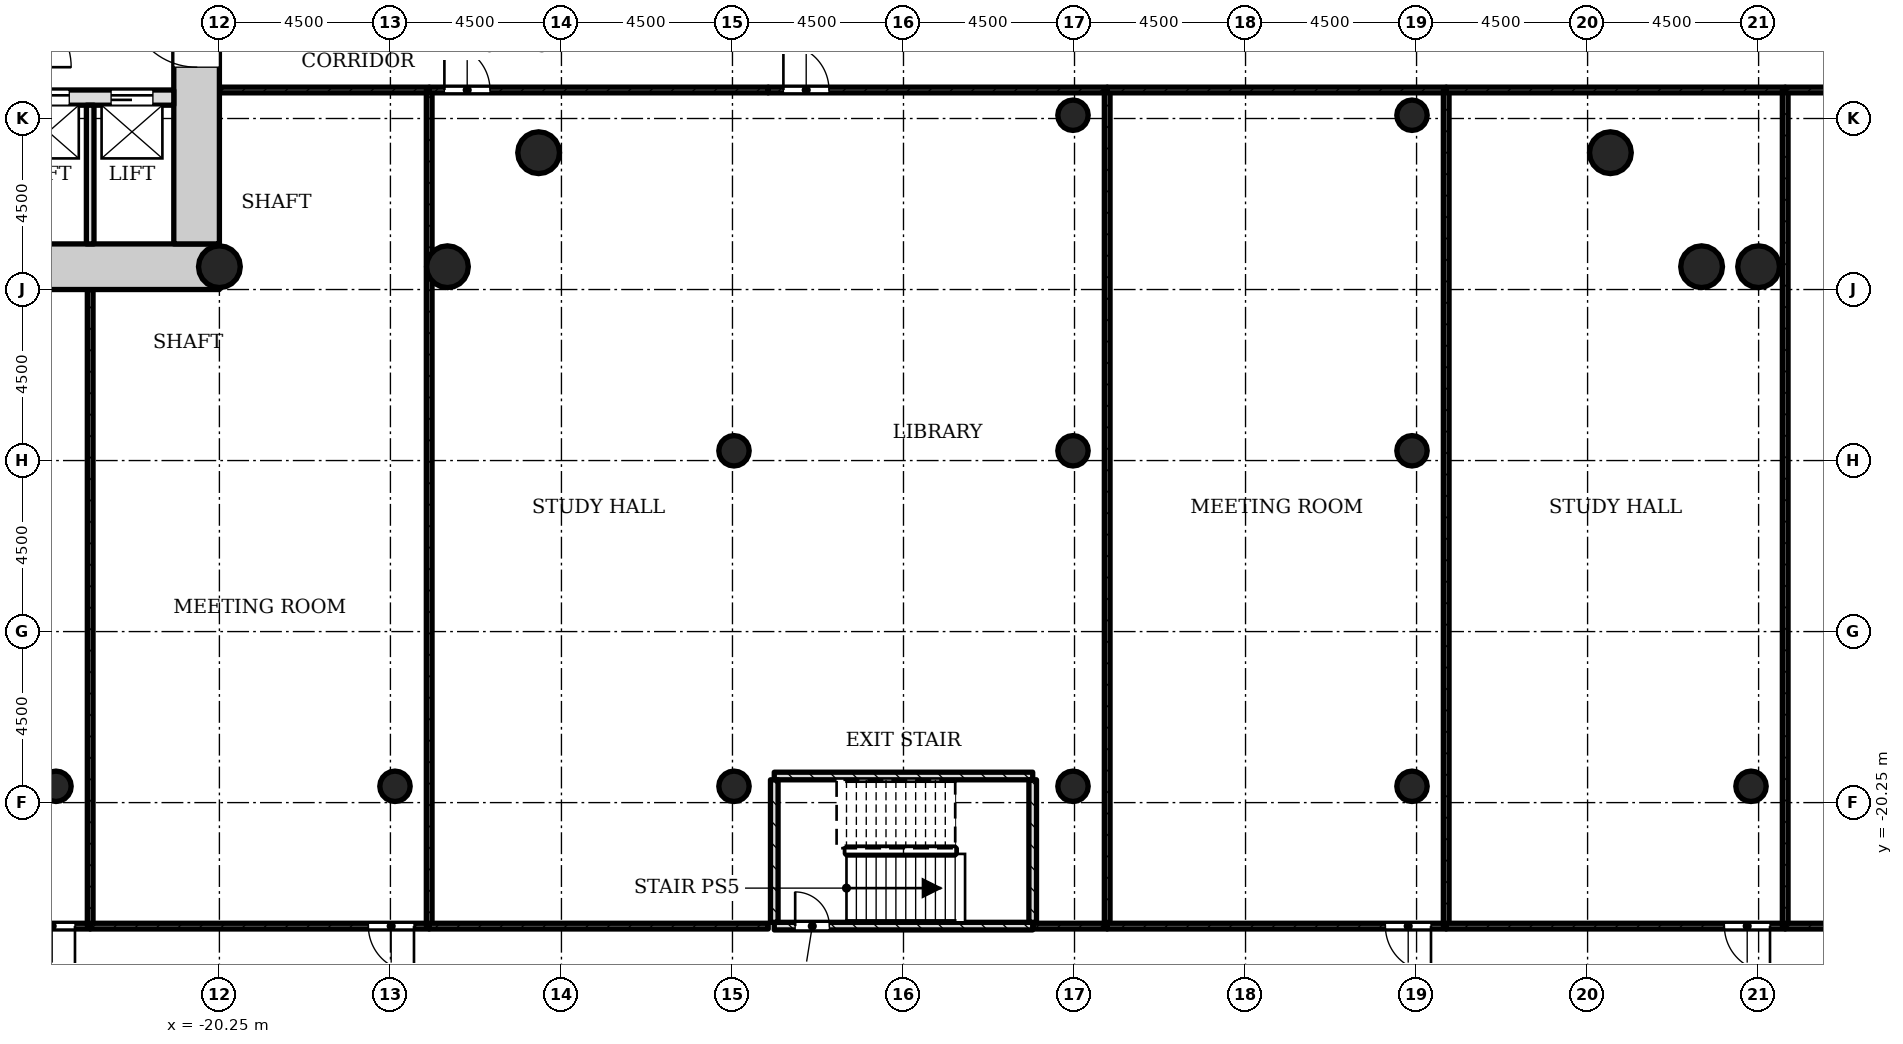
"""IFC4 building model, lengths in metres.
Left out: names, types, materials, properties, quantities, classifications, styles, units other than length and angle.
Written with IfcOpenShell. Run it as: python <this file> out.ifc"""

import sys

from ifc_helpers import new_model, si_unit, direction, frame, frame_2d, origin, origin_2d, place, context, subcontext, project, spatial, rectangle, hollow_circle, extrude, element, fill, save


model = new_model("IFC4")
c1 = context("Model", 3, precision=1e-05, world=origin(), true_north=direction((0.0, 1.0)))
c2 = subcontext(c1, "Body", "Model", "MODEL_VIEW")
j1 = project(units=[si_unit("LENGTHUNIT", "METRE"), si_unit("PLANEANGLEUNIT", "RADIAN")], contexts=[c1])
p1 = place(None, origin())
s1 = spatial("IfcSite", under=j1, at=p1, CompositionType="ELEMENT")
p2 = place(p1, origin())
s2 = spatial("IfcBuilding", under=s1, at=p2, CompositionType="ELEMENT")
p3 = place(p2, frame((0.0, 0.0, 11.0)))
s3 = spatial("IfcBuildingStorey", under=s2, at=p3, CompositionType="ELEMENT", Elevation=11.0)
p4 = place(p3, frame((-28.05, -6.15, 0.0), z_axis=(0.0, 0.0, 1.0), x_axis=(1.0, 0.0, 0.0)))
e1 = element("IfcWall", 1, at=p4, inside=s3, PredefinedType="SHEAR", context=c2, shape_type="SweptSolid", body=[
    extrude(rectangle(XDim=7.8, YDim=1.2, at=frame_2d((3.9, 0.0))), origin(), (0.0, 0.0, 1.0), 4.5),
])
p5 = place(p3, frame((-20.85, -5.55, 0.0), z_axis=(0.0, 0.0, 1.0), x_axis=(0.0, 1.0, 0.0)))
e2 = element("IfcWall", 2, at=p5, inside=s3, PredefinedType="SHEAR", context=c2, shape_type="SweptSolid", body=[
    extrude(rectangle(XDim=12.3, YDim=1.2, at=frame_2d((6.15, 0.0))), origin(), (0.0, 0.0, 1.0), 4.5),
])
p6 = place(p5, frame((4.65, 0.0, 0.0)))
e3 = element("IfcOpeningElement", 3, at=p6, cuts=e2, PredefinedType="OPENING", context=c2, shape_type="SweptSolid", body=[
    extrude(rectangle(XDim=1.8, YDim=2.1, at=frame_2d((0.9, 1.05))), frame((0.0, 0.61, 0.0), z_axis=(0.0, -1.0, 0.0), x_axis=(1.0, 0.0, 0.0)), (0.0, 0.0, 1.0), 1.22),
])
p7 = place(p3, frame((-28.05, -1.7, 0.0), z_axis=(0.0, 0.0, 1.0), x_axis=(1.0, 0.0, 0.0)))
e4 = element("IfcWall", 4, at=p7, inside=s3, PredefinedType="SHEAR", context=c2, shape_type="SweptSolid", body=[
    extrude(rectangle(XDim=6.6, YDim=0.4, at=frame_2d((3.3, 0.0))), origin(), (0.0, 0.0, 1.0), 4.5),
])
p8 = place(p7, frame((0.55, 0.0, 0.0)))
e5 = element("IfcOpeningElement", 5, at=p8, cuts=e4, PredefinedType="OPENING", context=c2, shape_type="SweptSolid", body=[
    extrude(rectangle(XDim=1.1, YDim=2.1, at=frame_2d((0.55, 1.05))), frame((0.0, 0.21, 0.0), z_axis=(0.0, -1.0, 0.0), x_axis=(1.0, 0.0, 0.0)), (0.0, 0.0, 1.0), 0.42),
])
p9 = place(p7, frame((2.75, 0.0, 0.0)))
e6 = element("IfcOpeningElement", 6, at=p9, cuts=e4, PredefinedType="OPENING", context=c2, shape_type="SweptSolid", body=[
    extrude(rectangle(XDim=1.1, YDim=2.1, at=frame_2d((0.55, 1.05))), frame((0.0, 0.21, 0.0), z_axis=(0.0, -1.0, 0.0), x_axis=(1.0, 0.0, 0.0)), (0.0, 0.0, 1.0), 0.42),
])
p10 = place(p7, frame((4.95, 0.0, 0.0)))
e7 = element("IfcOpeningElement", 7, at=p10, cuts=e4, PredefinedType="OPENING", context=c2, shape_type="SweptSolid", body=[
    extrude(rectangle(XDim=1.1, YDim=2.1, at=frame_2d((0.55, 1.05))), frame((0.0, 0.21, 0.0), z_axis=(0.0, -1.0, 0.0), x_axis=(1.0, 0.0, 0.0)), (0.0, 0.0, 1.0), 0.42),
])
for number, where, z_axis, x_axis in (
    (8, (-20.25, -6.15, 0.0), (0.0, 0.0, 1.0), (1.0, 0.0, 0.0)),
    (9, (-14.25, -6.15, 0.0), (0.0, 0.0, 1.0), (1.0, 0.0, 0.0)),
    (10, (-11.85, -3.15, 0.0), (0.0, 0.0, 1.0), (1.0, 0.0, 0.0)),
    (11, (20.25, -6.15, 0.0), (0.0, 0.0, 1.0), (1.0, 0.0, 0.0)),
    (12, (18.75, -6.15, 0.0), (0.0, 0.0, 1.0), (1.0, 0.0, 0.0)),
    (13, (16.35, -3.15, 0.0), (0.0, 0.0, 1.0), (1.0, 0.0, 0.0)),
):
    element("IfcColumn", number, at=place(p3, frame(where, z_axis=z_axis, x_axis=x_axis)), inside=s3, PredefinedType="COLUMN", context=c2, shape_type="SweptSolid", body=[
        extrude(hollow_circle(Radius=0.55, WallThickness=0.04, at=origin_2d()), origin(), (0.0, 0.0, 1.0), 4.5),
    ])
for number, where, z_axis, x_axis in (
    (14, (-24.55, -19.821, 0.0), (0.0, 0.0, 1.0), (1.0, 0.0, 0.0)),
    (15, (-15.63, -19.821, 0.0), (0.0, 0.0, 1.0), (1.0, 0.0, 0.0)),
    (16, (-6.71, -19.821, 0.0), (0.0, 0.0, 1.0), (1.0, 0.0, 0.0)),
    (17, (2.21, -19.821, 0.0), (0.0, 0.0, 1.0), (1.0, 0.0, 0.0)),
    (18, (11.13, -19.821, 0.0), (0.0, 0.0, 1.0), (1.0, 0.0, 0.0)),
    (19, (20.05, -19.821, 0.0), (0.0, 0.0, 1.0), (1.0, 0.0, 0.0)),
    (20, (-6.71, -10.993, 0.0), (0.0, 0.0, 1.0), (1.0, 0.0, 0.0)),
    (21, (2.21, -10.993, 0.0), (0.0, 0.0, 1.0), (1.0, 0.0, 0.0)),
    (22, (11.13, -10.993, 0.0), (0.0, 0.0, 1.0), (1.0, 0.0, 0.0)),
    (23, (2.21, -2.164, 0.0), (0.0, 0.0, 1.0), (1.0, 0.0, 0.0)),
    (24, (11.13, -2.164, 0.0), (0.0, 0.0, 1.0), (1.0, 0.0, 0.0)),
):
    element("IfcColumn", number, at=place(p3, frame(where, z_axis=z_axis, x_axis=x_axis)), inside=s3, PredefinedType="COLUMN", context=c2, shape_type="SweptSolid", body=[
        extrude(hollow_circle(Radius=0.4, WallThickness=0.028, at=origin_2d()), origin(), (0.0, 0.0, 1.0), 4.5),
    ])
p11 = place(p3, frame((-23.65, -5.55, 0.0), z_axis=(0.0, 0.0, 1.0), x_axis=(0.0, 1.0, 0.0)))
e25 = element("IfcWall", 25, at=p11, inside=s3, PredefinedType="SOLIDWALL", context=c2, shape_type="SweptSolid", body=[
    extrude(rectangle(XDim=3.65, YDim=0.2, at=frame_2d((1.825, 0.0))), origin(), (0.0, 0.0, 1.0), 4.08),
])
p12 = place(p3, frame((-23.65, -23.5, 0.0), z_axis=(0.0, 0.0, 1.0), x_axis=(-1.0, 0.0, 0.0)))
e26 = element("IfcWall", 26, at=p12, inside=s3, PredefinedType="PARTITIONING", context=c2, shape_type="SweptSolid", body=[
    extrude(rectangle(XDim=8.92, YDim=0.15, at=frame_2d((4.46, 0.0))), origin(), (0.0, 0.0, 1.0), 4.08),
])
p13 = place(p12, frame((0.4, 0.0, 0.0)))
e27 = element("IfcOpeningElement", 27, at=p13, cuts=e26, PredefinedType="OPENING", context=c2, shape_type="SweptSolid", body=[
    extrude(rectangle(XDim=1.2, YDim=2.1, at=frame_2d((0.6, 1.05))), frame((0.0, 0.085, 0.0), z_axis=(0.0, -1.0, 0.0), x_axis=(1.0, 0.0, 0.0)), (0.0, 0.0, 1.0), 0.17),
])
p14 = place(p3, frame((-23.65, -6.75, 0.0), z_axis=(0.0, 0.0, 1.0), x_axis=(0.0, -1.0, 0.0)))
e28 = element("IfcWall", 28, at=p14, inside=s3, PredefinedType="PARTITIONING", context=c2, shape_type="SweptSolid", body=[
    extrude(rectangle(XDim=16.75, YDim=0.15, at=frame_2d((8.375, 0.0))), origin(), (0.0, 0.0, 1.0), 4.08),
])
p15 = place(p3, frame((-20.25, -1.5, 0.0), z_axis=(0.0, 0.0, 1.0), x_axis=(1.0, 0.0, 0.0)))
e29 = element("IfcWall", 29, at=p15, inside=s3, PredefinedType="PARTITIONING", context=c2, shape_type="SweptSolid", body=[
    extrude(rectangle(XDim=5.52, YDim=0.15, at=frame_2d((2.76, 0.0))), origin(), (0.0, 0.0, 1.0), 4.08),
])
p16 = place(p3, frame((-14.73, -23.5, 0.0), z_axis=(0.0, 0.0, 1.0), x_axis=(-1.0, 0.0, 0.0)))
e30 = element("IfcWall", 30, at=p16, inside=s3, PredefinedType="PARTITIONING", context=c2, shape_type="SweptSolid", body=[
    extrude(rectangle(XDim=8.92, YDim=0.15, at=frame_2d((4.46, 0.0))), origin(), (0.0, 0.0, 1.0), 4.08),
])
p17 = place(p16, frame((0.4, 0.0, 0.0)))
e31 = element("IfcOpeningElement", 31, at=p17, cuts=e30, PredefinedType="OPENING", context=c2, shape_type="SweptSolid", body=[
    extrude(rectangle(XDim=1.2, YDim=2.1, at=frame_2d((0.6, 1.05))), frame((0.0, 0.085, 0.0), z_axis=(0.0, -1.0, 0.0), x_axis=(1.0, 0.0, 0.0)), (0.0, 0.0, 1.0), 0.17),
])
p18 = place(p3, frame((-14.73, -1.5, 0.0), z_axis=(0.0, 0.0, 1.0), x_axis=(0.0, -1.0, 0.0)))
e32 = element("IfcWall", 32, at=p18, inside=s3, PredefinedType="PARTITIONING", context=c2, shape_type="SweptSolid", body=[
    extrude(rectangle(XDim=22.0, YDim=0.15, at=frame_2d((11.0, 0.0))), origin(), (0.0, 0.0, 1.0), 4.08),
])
p19 = place(p3, frame((-14.73, -1.5, 0.0), z_axis=(0.0, 0.0, 1.0), x_axis=(1.0, 0.0, 0.0)))
e33 = element("IfcWall", 33, at=p19, inside=s3, PredefinedType="PARTITIONING", context=c2, shape_type="SweptSolid", body=[
    extrude(rectangle(XDim=8.92, YDim=0.15, at=frame_2d((4.46, 0.0))), origin(), (0.0, 0.0, 1.0), 4.08),
])
p20 = place(p19, frame((0.4, 0.0, 0.0)))
e34 = element("IfcOpeningElement", 34, at=p20, cuts=e33, PredefinedType="OPENING", context=c2, shape_type="SweptSolid", body=[
    extrude(rectangle(XDim=1.2, YDim=2.1, at=frame_2d((0.6, 1.05))), frame((0.0, 0.085, 0.0), z_axis=(0.0, -1.0, 0.0), x_axis=(1.0, 0.0, 0.0)), (0.0, 0.0, 1.0), 0.17),
])
p21 = place(p3, frame((-5.81, -23.5, 0.0), z_axis=(0.0, 0.0, 1.0), x_axis=(-1.0, 0.0, 0.0)))
e35 = element("IfcWall", 35, at=p21, inside=s3, PredefinedType="PARTITIONING", context=c2, shape_type="SweptSolid", body=[
    extrude(rectangle(XDim=8.92, YDim=0.15, at=frame_2d((4.46, 0.0))), origin(), (0.0, 0.0, 1.0), 4.08),
])
p22 = place(p3, frame((-5.65, -23.5, 0.0), z_axis=(0.0, 0.0, 1.0), x_axis=(1.0, 0.0, 0.0)))
e36 = element("IfcWall", 36, at=p22, inside=s3, PredefinedType="SHEAR", context=c2, shape_type="SweptSolid", body=[
    extrude(rectangle(XDim=6.8, YDim=0.2, at=frame_2d((3.4, 0.0))), origin(), (0.0, 0.0, 1.0), 4.08),
])
p23 = place(p22, frame((0.55, 0.0, 0.0)))
e37 = element("IfcOpeningElement", 37, at=p23, cuts=e36, PredefinedType="OPENING", context=c2, shape_type="SweptSolid", body=[
    extrude(rectangle(XDim=0.9, YDim=2.1, at=frame_2d((0.45, 1.05))), frame((0.0, 0.11, 0.0), z_axis=(0.0, -1.0, 0.0), x_axis=(1.0, 0.0, 0.0)), (0.0, 0.0, 1.0), 0.22),
])
p24 = place(p3, frame((-5.65, -19.55, 0.0), z_axis=(0.0, 0.0, 1.0), x_axis=(1.0, 0.0, 0.0)))
e38 = element("IfcWall", 38, at=p24, inside=s3, PredefinedType="SHEAR", context=c2, shape_type="SweptSolid", body=[
    extrude(rectangle(XDim=6.8, YDim=0.2, at=frame_2d((3.4, 0.0))), origin(), (0.0, 0.0, 1.0), 4.08),
])
for number, where, z_axis, x_axis in (
    (39, (-5.65, -23.4, 0.0), (0.0, 0.0, 1.0), (0.0, 1.0, 0.0)),
    (40, (1.15, -23.4, 0.0), (0.0, 0.0, 1.0), (0.0, 1.0, 0.0)),
):
    element("IfcWall", number, at=place(p3, frame(where, z_axis=z_axis, x_axis=x_axis)), inside=s3, PredefinedType="SHEAR", context=c2, shape_type="SweptSolid", body=[
        extrude(rectangle(XDim=3.75, YDim=0.2, at=frame_2d((1.875, 0.0))), origin(), (0.0, 0.0, 1.0), 4.08),
    ])
p25 = place(p3, frame((-5.81, -1.5, 0.0), z_axis=(0.0, 0.0, 1.0), x_axis=(1.0, 0.0, 0.0)))
e41 = element("IfcWall", 41, at=p25, inside=s3, PredefinedType="PARTITIONING", context=c2, shape_type="SweptSolid", body=[
    extrude(rectangle(XDim=8.92, YDim=0.15, at=frame_2d((4.46, 0.0))), origin(), (0.0, 0.0, 1.0), 4.08),
])
p26 = place(p25, frame((0.4, 0.0, 0.0)))
e42 = element("IfcOpeningElement", 42, at=p26, cuts=e41, PredefinedType="OPENING", context=c2, shape_type="SweptSolid", body=[
    extrude(rectangle(XDim=1.2, YDim=2.1, at=frame_2d((0.6, 1.05))), frame((0.0, 0.085, 0.0), z_axis=(0.0, -1.0, 0.0), x_axis=(1.0, 0.0, 0.0)), (0.0, 0.0, 1.0), 0.17),
])
p27 = place(p3, frame((3.11, -23.5, 0.0), z_axis=(0.0, 0.0, 1.0), x_axis=(-1.0, 0.0, 0.0)))
e43 = element("IfcWall", 43, at=p27, inside=s3, PredefinedType="PARTITIONING", context=c2, shape_type="SweptSolid", body=[
    extrude(rectangle(XDim=1.96, YDim=0.15, at=frame_2d((0.98, 0.0))), origin(), (0.0, 0.0, 1.0), 4.08),
])
p28 = place(p3, frame((3.11, -1.5, 0.0), z_axis=(0.0, 0.0, 1.0), x_axis=(0.0, -1.0, 0.0)))
e44 = element("IfcWall", 44, at=p28, inside=s3, PredefinedType="PARTITIONING", context=c2, shape_type="SweptSolid", body=[
    extrude(rectangle(XDim=22.0, YDim=0.15, at=frame_2d((11.0, 0.0))), origin(), (0.0, 0.0, 1.0), 4.08),
])
p29 = place(p3, frame((12.03, -23.5, 0.0), z_axis=(0.0, 0.0, 1.0), x_axis=(-1.0, 0.0, 0.0)))
e45 = element("IfcWall", 45, at=p29, inside=s3, PredefinedType="PARTITIONING", context=c2, shape_type="SweptSolid", body=[
    extrude(rectangle(XDim=8.92, YDim=0.15, at=frame_2d((4.46, 0.0))), origin(), (0.0, 0.0, 1.0), 4.08),
])
p30 = place(p29, frame((0.4, 0.0, 0.0)))
e46 = element("IfcOpeningElement", 46, at=p30, cuts=e45, PredefinedType="OPENING", context=c2, shape_type="SweptSolid", body=[
    extrude(rectangle(XDim=1.2, YDim=2.1, at=frame_2d((0.6, 1.05))), frame((0.0, 0.085, 0.0), z_axis=(0.0, -1.0, 0.0), x_axis=(1.0, 0.0, 0.0)), (0.0, 0.0, 1.0), 0.17),
])
p31 = place(p3, frame((3.11, -1.5, 0.0), z_axis=(0.0, 0.0, 1.0), x_axis=(1.0, 0.0, 0.0)))
e47 = element("IfcWall", 47, at=p31, inside=s3, PredefinedType="PARTITIONING", context=c2, shape_type="SweptSolid", body=[
    extrude(rectangle(XDim=8.92, YDim=0.15, at=frame_2d((4.46, 0.0))), origin(), (0.0, 0.0, 1.0), 4.08),
])
p32 = place(p3, frame((12.03, -1.5, 0.0), z_axis=(0.0, 0.0, 1.0), x_axis=(0.0, -1.0, 0.0)))
e48 = element("IfcWall", 48, at=p32, inside=s3, PredefinedType="PARTITIONING", context=c2, shape_type="SweptSolid", body=[
    extrude(rectangle(XDim=22.0, YDim=0.15, at=frame_2d((11.0, 0.0))), origin(), (0.0, 0.0, 1.0), 4.08),
])
p33 = place(p3, frame((20.95, -23.5, 0.0), z_axis=(0.0, 0.0, 1.0), x_axis=(-1.0, 0.0, 0.0)))
e49 = element("IfcWall", 49, at=p33, inside=s3, PredefinedType="PARTITIONING", context=c2, shape_type="SweptSolid", body=[
    extrude(rectangle(XDim=8.92, YDim=0.15, at=frame_2d((4.46, 0.0))), origin(), (0.0, 0.0, 1.0), 4.08),
])
p34 = place(p33, frame((0.4, 0.0, 0.0)))
e50 = element("IfcOpeningElement", 50, at=p34, cuts=e49, PredefinedType="OPENING", context=c2, shape_type="SweptSolid", body=[
    extrude(rectangle(XDim=1.2, YDim=2.1, at=frame_2d((0.6, 1.05))), frame((0.0, 0.085, 0.0), z_axis=(0.0, -1.0, 0.0), x_axis=(1.0, 0.0, 0.0)), (0.0, 0.0, 1.0), 0.17),
])
p35 = place(p3, frame((12.03, -1.5, 0.0), z_axis=(0.0, 0.0, 1.0), x_axis=(1.0, 0.0, 0.0)))
e51 = element("IfcWall", 51, at=p35, inside=s3, PredefinedType="PARTITIONING", context=c2, shape_type="SweptSolid", body=[
    extrude(rectangle(XDim=8.92, YDim=0.15, at=frame_2d((4.46, 0.0))), origin(), (0.0, 0.0, 1.0), 4.08),
])
p36 = place(p3, frame((20.95, -1.5, 0.0), z_axis=(0.0, 0.0, 1.0), x_axis=(0.0, -1.0, 0.0)))
e52 = element("IfcWall", 52, at=p36, inside=s3, PredefinedType="PARTITIONING", context=c2, shape_type="SweptSolid", body=[
    extrude(rectangle(XDim=22.0, YDim=0.15, at=frame_2d((11.0, 0.0))), origin(), (0.0, 0.0, 1.0), 4.08),
])
p37 = place(p3, frame((29.87, -23.5, 0.0), z_axis=(0.0, 0.0, 1.0), x_axis=(-1.0, 0.0, 0.0)))
e53 = element("IfcWall", 53, at=p37, inside=s3, PredefinedType="PARTITIONING", context=c2, shape_type="SweptSolid", body=[
    extrude(rectangle(XDim=8.92, YDim=0.15, at=frame_2d((4.46, 0.0))), origin(), (0.0, 0.0, 1.0), 4.08),
])
p38 = place(p37, frame((1.0, 0.0, 0.0)))
e54 = element("IfcOpeningElement", 54, at=p38, cuts=e53, PredefinedType="OPENING", context=c2, shape_type="SweptSolid", body=[
    extrude(rectangle(XDim=1.2, YDim=2.1, at=frame_2d((0.6, 1.05))), frame((0.0, 0.085, 0.0), z_axis=(0.0, -1.0, 0.0), x_axis=(1.0, 0.0, 0.0)), (0.0, 0.0, 1.0), 0.17),
])
p39 = place(p3, frame((20.95, -1.5, 0.0), z_axis=(0.0, 0.0, 1.0), x_axis=(1.0, 0.0, 0.0)))
e55 = element("IfcWall", 55, at=p39, inside=s3, PredefinedType="PARTITIONING", context=c2, shape_type="SweptSolid", body=[
    extrude(rectangle(XDim=8.3, YDim=0.15, at=frame_2d((4.15, 0.0))), origin(), (0.0, 0.0, 1.0), 4.08),
])
p40 = place(p13, origin())
e56 = element("IfcDoor", 56, at=p40, inside=s3, OperationType="SINGLE_SWING_RIGHT", PredefinedType="DOOR", context=c2, shape_type="SweptSolid", body=[
    extrude(rectangle(XDim=1.2, YDim=2.1, at=frame_2d((0.6, 1.05))), frame((0.0, 0.025, 0.0), z_axis=(0.0, -1.0, 0.0), x_axis=(1.0, 0.0, 0.0)), (0.0, 0.0, 1.0), 0.05),
])
fill(e27, e56)
p41 = place(p17, origin())
e57 = element("IfcDoor", 57, at=p41, inside=s3, OperationType="SINGLE_SWING_RIGHT", PredefinedType="DOOR", context=c2, shape_type="SweptSolid", body=[
    extrude(rectangle(XDim=1.2, YDim=2.1, at=frame_2d((0.6, 1.05))), frame((0.0, 0.025, 0.0), z_axis=(0.0, -1.0, 0.0), x_axis=(1.0, 0.0, 0.0)), (0.0, 0.0, 1.0), 0.05),
])
fill(e31, e57)
p42 = place(p20, origin())
e58 = element("IfcDoor", 58, at=p42, inside=s3, OperationType="SINGLE_SWING_RIGHT", PredefinedType="DOOR", context=c2, shape_type="SweptSolid", body=[
    extrude(rectangle(XDim=1.2, YDim=2.1, at=frame_2d((0.6, 1.05))), frame((0.0, 0.025, 0.0), z_axis=(0.0, -1.0, 0.0), x_axis=(1.0, 0.0, 0.0)), (0.0, 0.0, 1.0), 0.05),
])
fill(e34, e58)
p43 = place(p23, origin())
e59 = element("IfcDoor", 59, at=p43, inside=s3, OperationType="SINGLE_SWING_RIGHT", PredefinedType="DOOR", context=c2, shape_type="SweptSolid", body=[
    extrude(rectangle(XDim=0.9, YDim=2.1, at=frame_2d((0.45, 1.05))), frame((0.0, 0.025, 0.0), z_axis=(0.0, -1.0, 0.0), x_axis=(1.0, 0.0, 0.0)), (0.0, 0.0, 1.0), 0.05),
])
fill(e37, e59)
p44 = place(p9, origin())
e60 = element("IfcDoor", 60, at=p44, inside=s3, OperationType="SLIDING_TO_LEFT", PredefinedType="DOOR", context=c2, shape_type="SweptSolid", body=[
    extrude(rectangle(XDim=1.1, YDim=2.1, at=frame_2d((0.55, 1.05))), frame((0.0, 0.025, 0.0), z_axis=(0.0, -1.0, 0.0), x_axis=(1.0, 0.0, 0.0)), (0.0, 0.0, 1.0), 0.05),
])
fill(e6, e60)
p45 = place(p10, origin())
e61 = element("IfcDoor", 61, at=p45, inside=s3, OperationType="SLIDING_TO_LEFT", PredefinedType="DOOR", context=c2, shape_type="SweptSolid", body=[
    extrude(rectangle(XDim=1.1, YDim=2.1, at=frame_2d((0.55, 1.05))), frame((0.0, 0.025, 0.0), z_axis=(0.0, -1.0, 0.0), x_axis=(1.0, 0.0, 0.0)), (0.0, 0.0, 1.0), 0.05),
])
fill(e7, e61)
p46 = place(p6, origin())
e62 = element("IfcDoor", 62, at=p46, inside=s3, OperationType="SINGLE_SWING_LEFT", PredefinedType="DOOR", context=c2, shape_type="SweptSolid", body=[
    extrude(rectangle(XDim=1.8, YDim=2.1, at=frame_2d((0.9, 1.05))), frame((0.0, 0.025, 0.0), z_axis=(0.0, -1.0, 0.0), x_axis=(1.0, 0.0, 0.0)), (0.0, 0.0, 1.0), 0.05),
])
fill(e3, e62)
p47 = place(p26, origin())
e63 = element("IfcDoor", 63, at=p47, inside=s3, OperationType="SINGLE_SWING_RIGHT", PredefinedType="DOOR", context=c2, shape_type="SweptSolid", body=[
    extrude(rectangle(XDim=1.2, YDim=2.1, at=frame_2d((0.6, 1.05))), frame((0.0, 0.025, 0.0), z_axis=(0.0, -1.0, 0.0), x_axis=(1.0, 0.0, 0.0)), (0.0, 0.0, 1.0), 0.05),
])
fill(e42, e63)
p48 = place(p30, origin())
e64 = element("IfcDoor", 64, at=p48, inside=s3, OperationType="SINGLE_SWING_RIGHT", PredefinedType="DOOR", context=c2, shape_type="SweptSolid", body=[
    extrude(rectangle(XDim=1.2, YDim=2.1, at=frame_2d((0.6, 1.05))), frame((0.0, 0.025, 0.0), z_axis=(0.0, -1.0, 0.0), x_axis=(1.0, 0.0, 0.0)), (0.0, 0.0, 1.0), 0.05),
])
fill(e46, e64)
p49 = place(p34, origin())
e65 = element("IfcDoor", 65, at=p49, inside=s3, OperationType="SINGLE_SWING_RIGHT", PredefinedType="DOOR", context=c2, shape_type="SweptSolid", body=[
    extrude(rectangle(XDim=1.2, YDim=2.1, at=frame_2d((0.6, 1.05))), frame((0.0, 0.025, 0.0), z_axis=(0.0, -1.0, 0.0), x_axis=(1.0, 0.0, 0.0)), (0.0, 0.0, 1.0), 0.05),
])
fill(e50, e65)
save(model, sys.argv[1])
